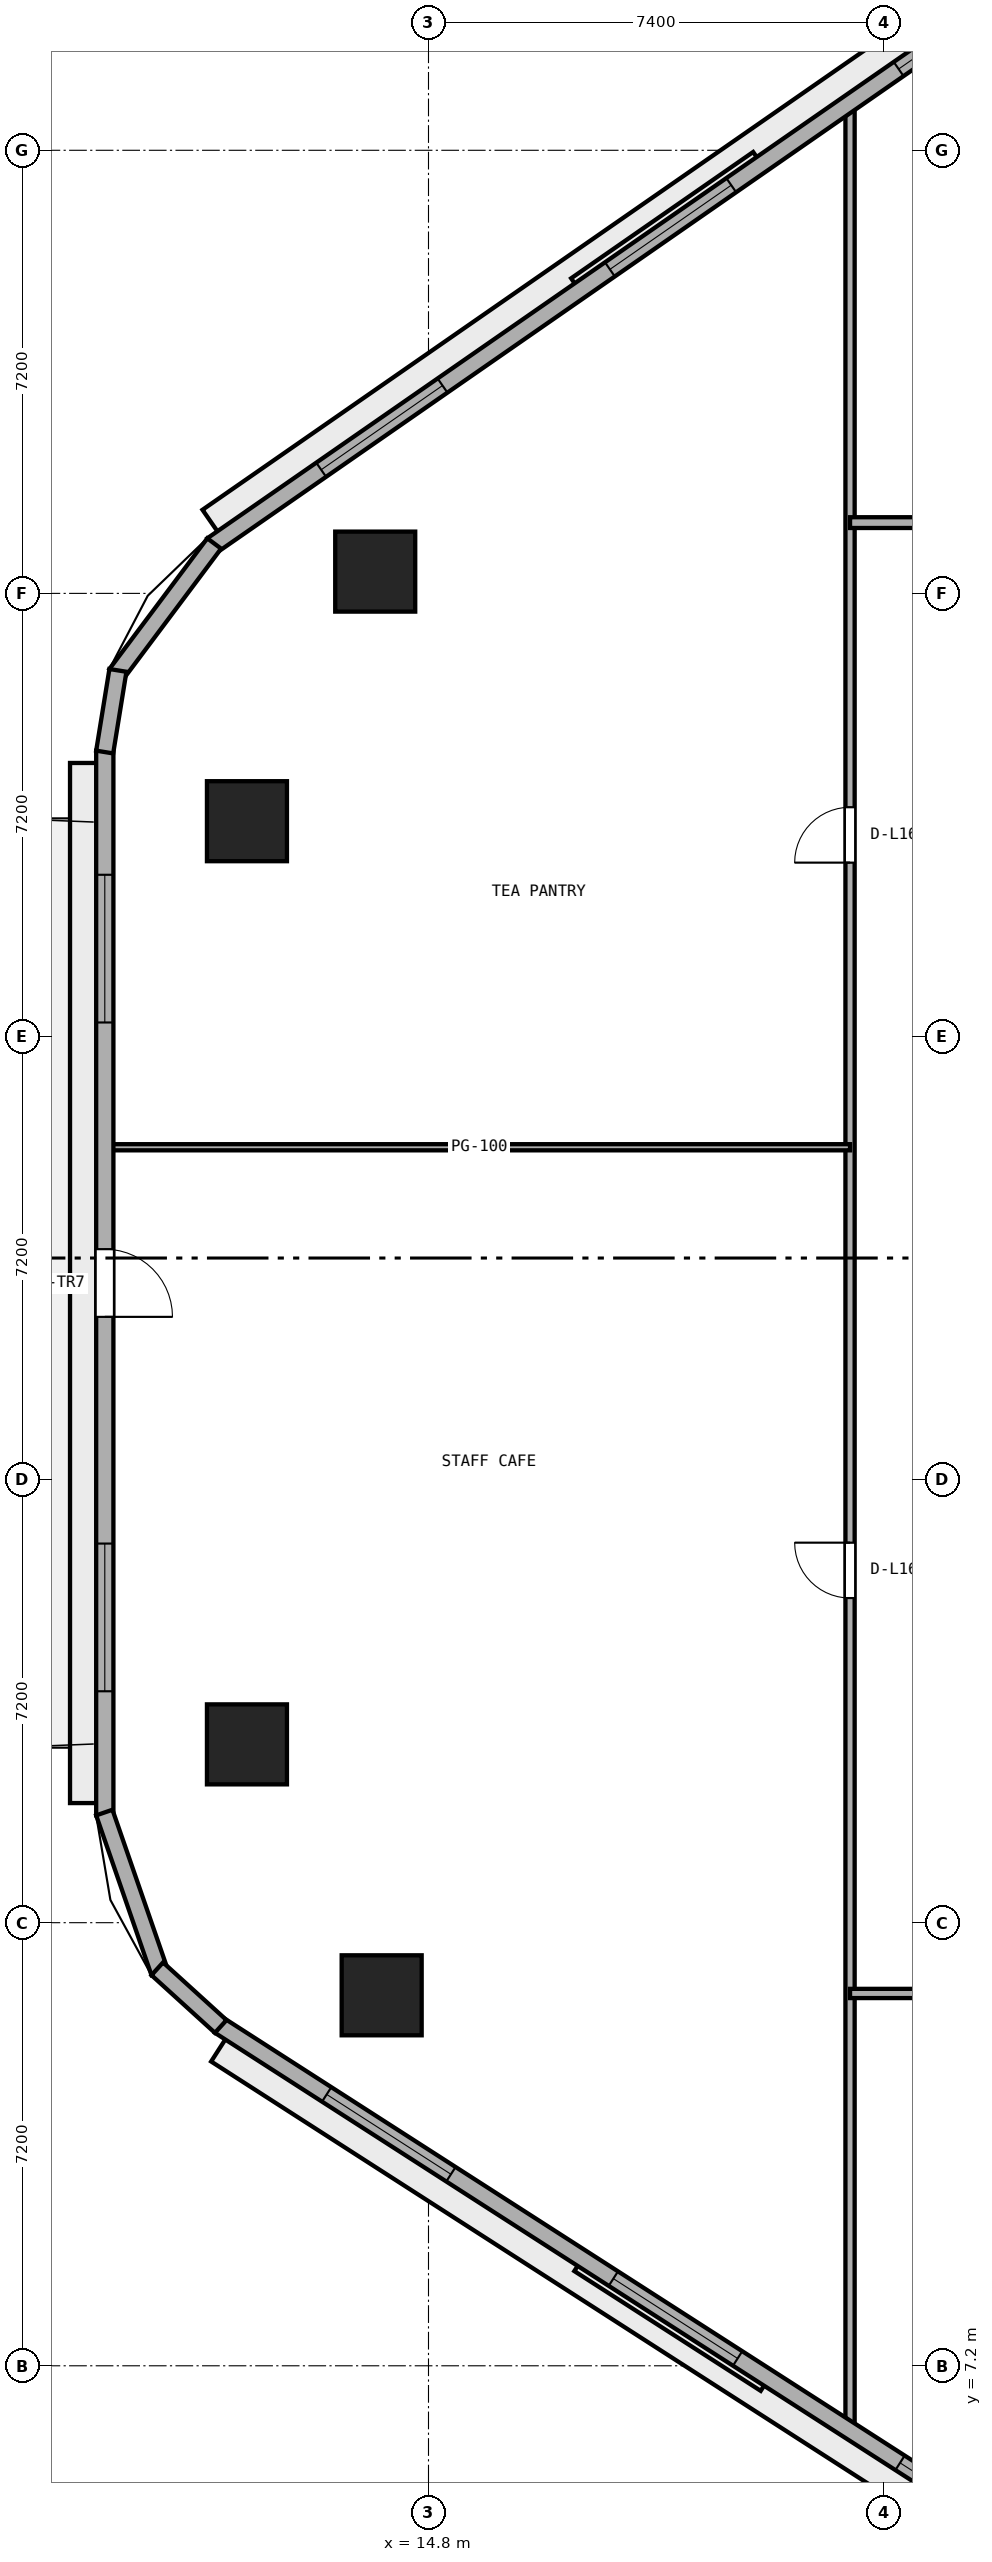
"""IFC4 building model, lengths in metres.
Left out: names, types, materials, properties, quantities, classifications, styles, units other than length and angle.
Written with IfcOpenShell. Run it as: python <this file> out.ifc"""

import sys

from ifc_helpers import new_model, si_unit, direction, frame, frame_2d, origin, origin_2d, place, context, subcontext, project, spatial, rectangle, extrude, element, fill, save


model = new_model("IFC4")
c1 = context("Model", 3, precision=1e-05, world=origin(), true_north=direction((0.0, 1.0)))
c2 = subcontext(c1, "Body", "Model", "MODEL_VIEW")
j1 = project(units=[si_unit("LENGTHUNIT", "METRE"), si_unit("PLANEANGLEUNIT", "RADIAN")], contexts=[c1])
p1 = place(None, origin())
s1 = spatial("IfcSite", under=j1, at=p1, CompositionType="ELEMENT")
p2 = place(p1, origin())
s2 = spatial("IfcBuilding", under=s1, at=p2, CompositionType="ELEMENT")
p3 = place(p2, frame((0.0, 0.0, 66.8)))
s3 = spatial("IfcBuildingStorey", under=s2, at=p3, CompositionType="ELEMENT", Elevation=66.8)
for number, where, z_axis, x_axis in (
    (1, (13.934, 36.354, 0.0), (0.0, 0.0, 1.0), (1.0, 0.0, 0.0)),
    (2, (11.85, 32.298, 0.0), (0.0, 0.0, 1.0), (1.0, 0.0, 0.0)),
    (3, (11.85, 17.298, 0.0), (0.0, 0.0, 1.0), (1.0, 0.0, 0.0)),
    (4, (14.039, 13.22, 0.0), (0.0, 0.0, 1.0), (1.0, 0.0, 0.0)),
):
    element("IfcColumn", number, at=place(p3, frame(where, z_axis=z_axis, x_axis=x_axis)), inside=s3, PredefinedType="COLUMN", context=c2, shape_type="SweptSolid", body=[
        extrude(rectangle(XDim=1.3, YDim=1.3, at=origin_2d()), origin(), (0.0, 0.0, 1.0), 3.8),
    ])
p4 = place(p3, frame((21.65, 6.119, 0.0), z_axis=(0.0, 0.0, 1.0), x_axis=(0.0, 1.0, 0.0)))
e5 = element("IfcWall", 5, at=p4, inside=s3, PredefinedType="PARTITIONING", context=c2, shape_type="SweptSolid", body=[
    extrude(rectangle(XDim=37.884, YDim=0.15, at=frame_2d((18.942, 0.0))), origin(), (0.0, 0.0, 1.0), 3.525),
])
p5 = place(p4, frame((13.556, 0.0, 0.0)))
e6 = element("IfcOpeningElement", 6, at=p5, cuts=e5, PredefinedType="OPENING", context=c2, shape_type="SweptSolid", body=[
    extrude(rectangle(XDim=0.9, YDim=2.1, at=frame_2d((0.45, 1.05))), frame((0.0, 0.085, 0.0), z_axis=(0.0, -1.0, 0.0), x_axis=(1.0, 0.0, 0.0)), (0.0, 0.0, 1.0), 0.17),
])
p6 = place(p4, frame((25.506, 0.0, 0.0)))
e7 = element("IfcOpeningElement", 7, at=p6, cuts=e5, PredefinedType="OPENING", context=c2, shape_type="SweptSolid", body=[
    extrude(rectangle(XDim=0.9, YDim=2.1, at=frame_2d((0.45, 1.05))), frame((0.0, 0.085, 0.0), z_axis=(0.0, -1.0, 0.0), x_axis=(1.0, 0.0, 0.0)), (0.0, 0.0, 1.0), 0.17),
])
p7 = place(p3, frame((21.65, 13.25, 0.0), z_axis=(0.0, 0.0, 1.0), x_axis=(1.0, 0.0, 0.0)))
e8 = element("IfcWall", 8, at=p7, inside=s3, PredefinedType="PARTITIONING", context=c2, shape_type="SweptSolid", body=[
    extrude(rectangle(XDim=30.7, YDim=0.15, at=frame_2d((15.35, 0.0))), origin(), (0.0, 0.0, 1.0), 3.525),
])
p8 = place(p7, frame((3.695, 0.0, 0.0)))
e9 = element("IfcOpeningElement", 9, at=p8, cuts=e8, PredefinedType="OPENING", context=c2, shape_type="SweptSolid", body=[
    extrude(rectangle(XDim=0.9, YDim=2.1, at=frame_2d((0.45, 1.05))), frame((0.0, 0.085, 0.0), z_axis=(0.0, -1.0, 0.0), x_axis=(1.0, 0.0, 0.0)), (0.0, 0.0, 1.0), 0.17),
])
p9 = place(p7, frame((11.95, 0.0, 0.0)))
e10 = element("IfcOpeningElement", 10, at=p9, cuts=e8, PredefinedType="OPENING", context=c2, shape_type="SweptSolid", body=[
    extrude(rectangle(XDim=0.9, YDim=2.1, at=frame_2d((0.45, 1.05))), frame((0.0, 0.085, 0.0), z_axis=(0.0, -1.0, 0.0), x_axis=(1.0, 0.0, 0.0)), (0.0, 0.0, 1.0), 0.17),
])
p10 = place(p7, frame((20.45, 0.0, 0.0)))
e11 = element("IfcOpeningElement", 11, at=p10, cuts=e8, PredefinedType="OPENING", context=c2, shape_type="SweptSolid", body=[
    extrude(rectangle(XDim=0.9, YDim=2.1, at=frame_2d((0.45, 1.05))), frame((0.0, 0.085, 0.0), z_axis=(0.0, -1.0, 0.0), x_axis=(1.0, 0.0, 0.0)), (0.0, 0.0, 1.0), 0.17),
])
p11 = place(p7, frame((27.305, 0.0, 0.0)))
e12 = element("IfcOpeningElement", 12, at=p11, cuts=e8, PredefinedType="OPENING", context=c2, shape_type="SweptSolid", body=[
    extrude(rectangle(XDim=0.9, YDim=2.1, at=frame_2d((0.45, 1.05))), frame((0.0, 0.085, 0.0), z_axis=(0.0, -1.0, 0.0), x_axis=(1.0, 0.0, 0.0)), (0.0, 0.0, 1.0), 0.17),
])
p12 = place(p3, frame((9.605, 27.0, 0.0), z_axis=(0.0, 0.0, 1.0), x_axis=(1.0, 0.0, 0.0)))
e13 = element("IfcWall", 13, at=p12, inside=s3, PredefinedType="PARTITIONING", context=c2, shape_type="SweptSolid", body=[
    extrude(rectangle(XDim=12.045, YDim=0.1, at=frame_2d((6.022, 0.0))), origin(), (0.0, 0.0, 1.0), 3.525),
])
p13 = place(p3, frame((21.65, 37.15, 0.0), z_axis=(0.0, 0.0, 1.0), x_axis=(1.0, 0.0, 0.0)))
e14 = element("IfcWall", 14, at=p13, inside=s3, PredefinedType="PARTITIONING", context=c2, shape_type="SweptSolid", body=[
    extrude(rectangle(XDim=30.7, YDim=0.175, at=frame_2d((15.35, 0.0))), origin(), (0.0, 0.0, 1.0), 3.525),
])
p14 = place(p13, frame((3.795, 0.0, 0.0)))
e15 = element("IfcOpeningElement", 15, at=p14, cuts=e14, PredefinedType="OPENING", context=c2, shape_type="SweptSolid", body=[
    extrude(rectangle(XDim=1.0, YDim=2.12, at=frame_2d((0.5, 1.06))), frame((0.0, 0.097, 0.0), z_axis=(0.0, -1.0, 0.0), x_axis=(1.0, 0.0, 0.0)), (0.0, 0.0, 1.0), 0.195),
])
p15 = place(p13, frame((18.905, 0.0, 0.0)))
e16 = element("IfcOpeningElement", 16, at=p15, cuts=e14, PredefinedType="OPENING", context=c2, shape_type="SweptSolid", body=[
    extrude(rectangle(XDim=1.0, YDim=2.12, at=frame_2d((0.5, 1.06))), frame((0.0, 0.097, 0.0), z_axis=(0.0, -1.0, 0.0), x_axis=(1.0, 0.0, 0.0)), (0.0, 0.0, 1.0), 0.195),
])
p16 = place(p3, frame((26.182, 47.118, 0.0), z_axis=(0.0, 0.0, 1.0), x_axis=(-0.821547956627, -0.570139417127, 0.0)))
e17 = element("IfcWall", 17, at=p16, inside=s3, PredefinedType="STANDARD", context=c2, shape_type="SweptSolid", body=[
    extrude(rectangle(XDim=18.132, YDim=0.28, at=frame_2d((9.066, 0.0))), origin(), (0.0, 0.0, 1.0), 3.525),
])
p17 = place(p16, frame((2.156, 0.0, 0.9)))
e18 = element("IfcOpeningElement", 18, at=p17, cuts=e17, PredefinedType="OPENING", context=c2, shape_type="SweptSolid", body=[
    extrude(rectangle(XDim=2.4, YDim=1.75, at=frame_2d((1.2, 0.875))), frame((0.0, 0.15, 0.0), z_axis=(0.0, -1.0, 0.0), x_axis=(1.0, 0.0, 0.0)), (0.0, 0.0, 1.0), 0.3),
])
p18 = place(p16, frame((7.866, 0.0, 0.9)))
e19 = element("IfcOpeningElement", 19, at=p18, cuts=e17, PredefinedType="OPENING", context=c2, shape_type="SweptSolid", body=[
    extrude(rectangle(XDim=2.4, YDim=1.75, at=frame_2d((1.2, 0.875))), frame((0.0, 0.15, 0.0), z_axis=(0.0, -1.0, 0.0), x_axis=(1.0, 0.0, 0.0)), (0.0, 0.0, 1.0), 0.3),
])
p19 = place(p16, frame((13.577, 0.0, 0.9)))
e20 = element("IfcOpeningElement", 20, at=p19, cuts=e17, PredefinedType="OPENING", context=c2, shape_type="SweptSolid", body=[
    extrude(rectangle(XDim=2.4, YDim=1.75, at=frame_2d((1.2, 0.875))), frame((0.0, 0.15, 0.0), z_axis=(0.0, -1.0, 0.0), x_axis=(1.0, 0.0, 0.0)), (0.0, 0.0, 1.0), 0.3),
])
p20 = place(p3, frame((9.54, 33.444, 0.0), z_axis=(0.0, 0.0, 1.0), x_axis=(0.0, -1.0, 0.0)))
e21 = element("IfcWall", 21, at=p20, inside=s3, PredefinedType="STANDARD", context=c2, shape_type="SweptSolid", body=[
    extrude(rectangle(XDim=17.301, YDim=0.28, at=frame_2d((8.65, 0.0))), origin(), (0.0, 0.0, 1.0), 3.525),
])
p21 = place(p20, frame((8.1, 0.0, 0.0)))
e22 = element("IfcOpeningElement", 22, at=p21, cuts=e21, PredefinedType="OPENING", context=c2, shape_type="SweptSolid", body=[
    extrude(rectangle(XDim=1.1, YDim=2.2, at=frame_2d((0.55, 1.1))), frame((0.0, 0.15, 0.0), z_axis=(0.0, -1.0, 0.0), x_axis=(1.0, 0.0, 0.0)), (0.0, 0.0, 1.0), 0.3),
])
p22 = place(p20, frame((2.017, 0.0, 0.9)))
e23 = element("IfcOpeningElement", 23, at=p22, cuts=e21, PredefinedType="OPENING", context=c2, shape_type="SweptSolid", body=[
    extrude(rectangle(XDim=2.4, YDim=1.75, at=frame_2d((1.2, 0.875))), frame((0.0, 0.15, 0.0), z_axis=(0.0, -1.0, 0.0), x_axis=(1.0, 0.0, 0.0)), (0.0, 0.0, 1.0), 0.3),
])
p23 = place(p20, frame((12.884, 0.0, 0.9)))
e24 = element("IfcOpeningElement", 24, at=p23, cuts=e21, PredefinedType="OPENING", context=c2, shape_type="SweptSolid", body=[
    extrude(rectangle(XDim=2.4, YDim=1.75, at=frame_2d((1.2, 0.875))), frame((0.0, 0.15, 0.0), z_axis=(0.0, -1.0, 0.0), x_axis=(1.0, 0.0, 0.0)), (0.0, 0.0, 1.0), 0.3),
])
p24 = place(p3, frame((11.405, 12.728, 0.0), z_axis=(0.0, 0.0, 1.0), x_axis=(0.841304564637, -0.540561402175, 0.0)))
e25 = element("IfcWall", 25, at=p24, inside=s3, PredefinedType="STANDARD", context=c2, shape_type="SweptSolid", body=[
    extrude(rectangle(XDim=17.612, YDim=0.28, at=frame_2d((8.806, 0.0))), origin(), (0.0, 0.0, 1.0), 3.525),
])
p25 = place(p24, frame((2.069, 0.0, 0.9)))
e26 = element("IfcOpeningElement", 26, at=p25, cuts=e25, PredefinedType="OPENING", context=c2, shape_type="SweptSolid", body=[
    extrude(rectangle(XDim=2.4, YDim=1.75, at=frame_2d((1.2, 0.875))), frame((0.0, 0.15, 0.0), z_axis=(0.0, -1.0, 0.0), x_axis=(1.0, 0.0, 0.0)), (0.0, 0.0, 1.0), 0.3),
])
p26 = place(p24, frame((7.606, 0.0, 0.9)))
e27 = element("IfcOpeningElement", 27, at=p26, cuts=e25, PredefinedType="OPENING", context=c2, shape_type="SweptSolid", body=[
    extrude(rectangle(XDim=2.4, YDim=1.75, at=frame_2d((1.2, 0.875))), frame((0.0, 0.15, 0.0), z_axis=(0.0, -1.0, 0.0), x_axis=(1.0, 0.0, 0.0)), (0.0, 0.0, 1.0), 0.3),
])
p27 = place(p24, frame((13.143, 0.0, 0.9)))
e28 = element("IfcOpeningElement", 28, at=p27, cuts=e25, PredefinedType="OPENING", context=c2, shape_type="SweptSolid", body=[
    extrude(rectangle(XDim=2.4, YDim=1.75, at=frame_2d((1.2, 0.875))), frame((0.0, 0.15, 0.0), z_axis=(0.0, -1.0, 0.0), x_axis=(1.0, 0.0, 0.0)), (0.0, 0.0, 1.0), 0.3),
])
p28 = place(p3, frame((11.318, 36.811, 0.0), z_axis=(0.0, 0.0, 1.0), x_axis=(-0.599455152629, -0.800408345775, 0.0)))
e29 = element("IfcWall", 29, at=p28, inside=s3, PredefinedType="STANDARD", context=c2, shape_type="SweptSolid", body=[
    extrude(rectangle(XDim=2.653, YDim=0.28, at=frame_2d((1.327, 0.0))), origin(), (0.0, 0.0, 1.0), 3.525),
])
p29 = place(p3, frame((9.753, 34.749, 0.0), z_axis=(0.0, 0.0, 1.0), x_axis=(-0.160037671962, -0.987110907423, 0.0)))
e30 = element("IfcWall", 30, at=p29, inside=s3, PredefinedType="STANDARD", context=c2, shape_type="SweptSolid", body=[
    extrude(rectangle(XDim=1.344, YDim=0.28, at=frame_2d((0.672, 0.0))), origin(), (0.0, 0.0, 1.0), 3.525),
])
p30 = place(p3, frame((9.532, 16.189, 0.0), z_axis=(0.0, 0.0, 1.0), x_axis=(0.32708309668, -0.944995580871, 0.0)))
e31 = element("IfcWall", 31, at=p30, inside=s3, PredefinedType="STANDARD", context=c2, shape_type="SweptSolid", body=[
    extrude(rectangle(XDim=2.748, YDim=0.28, at=frame_2d((1.374, 0.0))), origin(), (0.0, 0.0, 1.0), 3.525),
])
p31 = place(p3, frame((10.393, 13.651, 0.0), z_axis=(0.0, 0.0, 1.0), x_axis=(0.74003521851, -0.672568119498, 0.0)))
e32 = element("IfcWall", 32, at=p31, inside=s3, PredefinedType="STANDARD", context=c2, shape_type="SweptSolid", body=[
    extrude(rectangle(XDim=1.393, YDim=0.28, at=frame_2d((0.697, 0.0))), origin(), (0.0, 0.0, 1.0), 3.525),
])
p32 = place(p5, origin())
e33 = element("IfcDoor", 33, at=p32, inside=s3, OperationType="SINGLE_SWING_RIGHT", PredefinedType="DOOR", context=c2, shape_type="SweptSolid", body=[
    extrude(rectangle(XDim=0.9, YDim=2.1, at=frame_2d((0.45, 1.05))), frame((0.0, 0.025, 0.0), z_axis=(0.0, -1.0, 0.0), x_axis=(1.0, 0.0, 0.0)), (0.0, 0.0, 1.0), 0.05),
])
fill(e6, e33)
p33 = place(p6, origin())
e34 = element("IfcDoor", 34, at=p33, inside=s3, OperationType="SINGLE_SWING_LEFT", PredefinedType="DOOR", context=c2, shape_type="SweptSolid", body=[
    extrude(rectangle(XDim=0.9, YDim=2.1, at=frame_2d((0.45, 1.05))), frame((0.0, 0.025, 0.0), z_axis=(0.0, -1.0, 0.0), x_axis=(1.0, 0.0, 0.0)), (0.0, 0.0, 1.0), 0.05),
])
fill(e7, e34)
p34 = place(p17, origin())
e35 = element("IfcWindow", 35, at=p34, inside=s3, PartitioningType="SINGLE_PANEL", PredefinedType="WINDOW", context=c2, shape_type="SweptSolid", body=[
    extrude(rectangle(XDim=2.4, YDim=1.75, at=frame_2d((1.2, 0.875))), frame((0.0, 0.03, 0.0), z_axis=(0.0, -1.0, 0.0), x_axis=(1.0, 0.0, 0.0)), (0.0, 0.0, 1.0), 0.06),
])
fill(e18, e35)
p35 = place(p18, origin())
e36 = element("IfcWindow", 36, at=p35, inside=s3, PartitioningType="SINGLE_PANEL", PredefinedType="WINDOW", context=c2, shape_type="SweptSolid", body=[
    extrude(rectangle(XDim=2.4, YDim=1.75, at=frame_2d((1.2, 0.875))), frame((0.0, 0.03, 0.0), z_axis=(0.0, -1.0, 0.0), x_axis=(1.0, 0.0, 0.0)), (0.0, 0.0, 1.0), 0.06),
])
fill(e19, e36)
p36 = place(p19, origin())
e37 = element("IfcWindow", 37, at=p36, inside=s3, PartitioningType="SINGLE_PANEL", PredefinedType="WINDOW", context=c2, shape_type="SweptSolid", body=[
    extrude(rectangle(XDim=2.4, YDim=1.75, at=frame_2d((1.2, 0.875))), frame((0.0, 0.03, 0.0), z_axis=(0.0, -1.0, 0.0), x_axis=(1.0, 0.0, 0.0)), (0.0, 0.0, 1.0), 0.06),
])
fill(e20, e37)
p37 = place(p21, origin())
e38 = element("IfcDoor", 38, at=p37, inside=s3, OperationType="SINGLE_SWING_RIGHT", PredefinedType="DOOR", context=c2, shape_type="SweptSolid", body=[
    extrude(rectangle(XDim=1.1, YDim=2.2, at=frame_2d((0.55, 1.1))), frame((0.0, 0.025, 0.0), z_axis=(0.0, -1.0, 0.0), x_axis=(1.0, 0.0, 0.0)), (0.0, 0.0, 1.0), 0.05),
])
fill(e22, e38)
p38 = place(p22, origin())
e39 = element("IfcWindow", 39, at=p38, inside=s3, PartitioningType="SINGLE_PANEL", PredefinedType="WINDOW", context=c2, shape_type="SweptSolid", body=[
    extrude(rectangle(XDim=2.4, YDim=1.75, at=frame_2d((1.2, 0.875))), frame((0.0, 0.03, 0.0), z_axis=(0.0, -1.0, 0.0), x_axis=(1.0, 0.0, 0.0)), (0.0, 0.0, 1.0), 0.06),
])
fill(e23, e39)
p39 = place(p23, origin())
e40 = element("IfcWindow", 40, at=p39, inside=s3, PartitioningType="SINGLE_PANEL", PredefinedType="WINDOW", context=c2, shape_type="SweptSolid", body=[
    extrude(rectangle(XDim=2.4, YDim=1.75, at=frame_2d((1.2, 0.875))), frame((0.0, 0.03, 0.0), z_axis=(0.0, -1.0, 0.0), x_axis=(1.0, 0.0, 0.0)), (0.0, 0.0, 1.0), 0.06),
])
fill(e24, e40)
p40 = place(p25, origin())
e41 = element("IfcWindow", 41, at=p40, inside=s3, PartitioningType="SINGLE_PANEL", PredefinedType="WINDOW", context=c2, shape_type="SweptSolid", body=[
    extrude(rectangle(XDim=2.4, YDim=1.75, at=frame_2d((1.2, 0.875))), frame((0.0, 0.03, 0.0), z_axis=(0.0, -1.0, 0.0), x_axis=(1.0, 0.0, 0.0)), (0.0, 0.0, 1.0), 0.06),
])
fill(e26, e41)
p41 = place(p26, origin())
e42 = element("IfcWindow", 42, at=p41, inside=s3, PartitioningType="SINGLE_PANEL", PredefinedType="WINDOW", context=c2, shape_type="SweptSolid", body=[
    extrude(rectangle(XDim=2.4, YDim=1.75, at=frame_2d((1.2, 0.875))), frame((0.0, 0.03, 0.0), z_axis=(0.0, -1.0, 0.0), x_axis=(1.0, 0.0, 0.0)), (0.0, 0.0, 1.0), 0.06),
])
fill(e27, e42)
p42 = place(p27, origin())
e43 = element("IfcWindow", 43, at=p42, inside=s3, PartitioningType="SINGLE_PANEL", PredefinedType="WINDOW", context=c2, shape_type="SweptSolid", body=[
    extrude(rectangle(XDim=2.4, YDim=1.75, at=frame_2d((1.2, 0.875))), frame((0.0, 0.03, 0.0), z_axis=(0.0, -1.0, 0.0), x_axis=(1.0, 0.0, 0.0)), (0.0, 0.0, 1.0), 0.06),
])
fill(e28, e43)
save(model, sys.argv[1])
